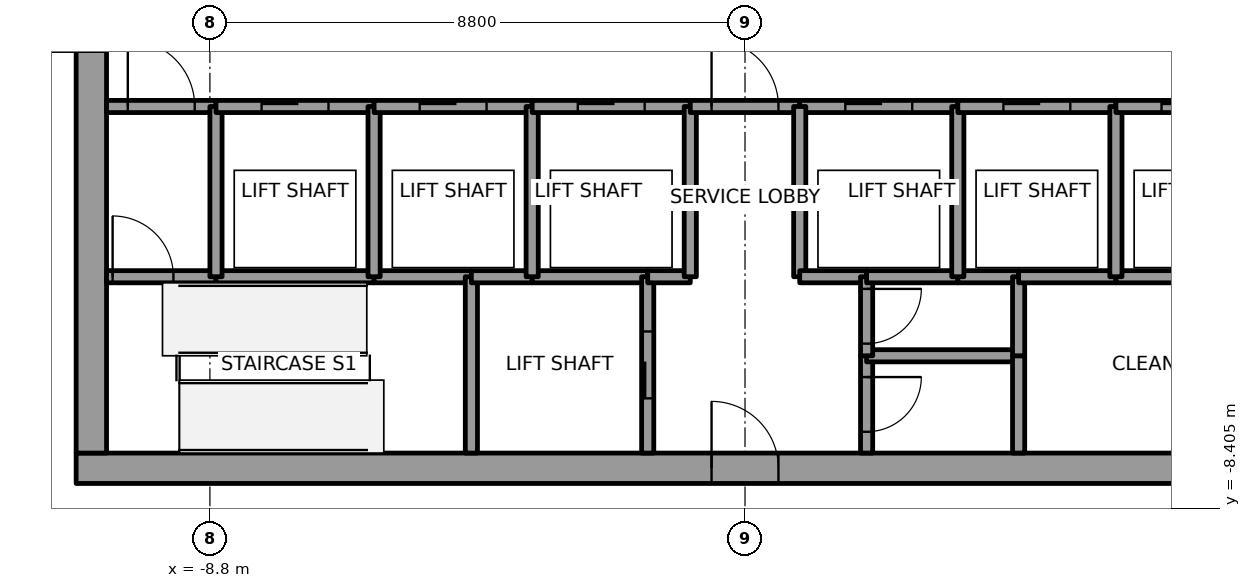
"""IFC4 building model, lengths in metres.
Left out: names, types, materials, properties, quantities, classifications, styles, units other than length and angle.
Written with IfcOpenShell. Run it as: python <this file> out.ifc"""

import sys

from ifc_helpers import new_model, si_unit, direction, frame, frame_2d, origin, place, context, subcontext, project, spatial, rectangle, extrude, element, fill, save


model = new_model("IFC4")
c1 = context("Model", 3, precision=1e-05, world=origin(), true_north=direction((0.0, 1.0)))
c2 = subcontext(c1, "Body", "Model", "MODEL_VIEW")
j1 = project(units=[si_unit("LENGTHUNIT", "METRE"), si_unit("PLANEANGLEUNIT", "RADIAN")], contexts=[c1])
p1 = place(None, origin())
s1 = spatial("IfcSite", under=j1, at=p1, CompositionType="ELEMENT")
p2 = place(p1, origin())
s2 = spatial("IfcBuilding", under=s1, at=p2, CompositionType="ELEMENT")
p3 = place(p2, frame((0.0, 0.0, 271.0)))
s3 = spatial("IfcBuildingStorey", under=s2, at=p3, CompositionType="ELEMENT", Elevation=271.0)
p4 = place(p3, frame((-11.0, -7.75, 0.0), z_axis=(0.0, 0.0, 1.0), x_axis=(1.0, 0.0, 0.0)))
e1 = element("IfcWall", 1, at=p4, inside=s3, PredefinedType="SHEAR", context=c2, shape_type="SweptSolid", body=[
    extrude(rectangle(XDim=22.0, YDim=0.5, at=frame_2d((11.0, 0.0))), origin(), (0.0, 0.0, 1.0), 4.0),
])
p5 = place(p4, frame((10.45, 0.0, 0.0)))
e2 = element("IfcOpeningElement", 2, at=p5, cuts=e1, PredefinedType="OPENING", context=c2, shape_type="SweptSolid", body=[
    extrude(rectangle(XDim=1.1, YDim=2.1, at=frame_2d((0.55, 1.05))), frame((0.0, 0.25, 0.0), z_axis=(0.0, -1.0, 0.0), x_axis=(1.0, 0.0, 0.0)), (0.0, 0.0, 1.0), 0.5),
])
p6 = place(p3, frame((-10.75, -7.5, 0.0), z_axis=(0.0, 0.0, 1.0), x_axis=(0.0, 1.0, 0.0)))
e3 = element("IfcWall", 3, at=p6, inside=s3, PredefinedType="SHEAR", context=c2, shape_type="SweptSolid", body=[
    extrude(rectangle(XDim=15.0, YDim=0.5, at=frame_2d((7.5, 0.0))), origin(), (0.0, 0.0, 1.0), 4.0),
])
p7 = place(p6, frame((6.6, 0.0, 0.0)))
e4 = element("IfcOpeningElement", 4, at=p7, cuts=e3, PredefinedType="OPENING", context=c2, shape_type="SweptSolid", body=[
    extrude(rectangle(XDim=1.8, YDim=2.1, at=frame_2d((0.9, 1.05))), frame((0.0, 0.25, 0.0), z_axis=(0.0, -1.0, 0.0), x_axis=(1.0, 0.0, 0.0)), (0.0, 0.0, 1.0), 0.5),
])
p8 = place(p3, frame((-10.5, -4.6, 0.0), z_axis=(0.0, 0.0, 1.0), x_axis=(1.0, 0.0, 0.0)))
e5 = element("IfcWall", 5, at=p8, inside=s3, PredefinedType="SOLIDWALL", context=c2, shape_type="SweptSolid", body=[
    extrude(rectangle(XDim=1.8, YDim=0.2, at=frame_2d((0.9, 0.0))), origin(), (0.0, 0.0, 1.0), 3.85),
])
p9 = place(p8, frame((0.1, 0.0, 0.0)))
e6 = element("IfcOpeningElement", 6, at=p9, cuts=e5, PredefinedType="OPENING", context=c2, shape_type="SweptSolid", body=[
    extrude(rectangle(XDim=1.0, YDim=2.1, at=frame_2d((0.5, 1.05))), frame((0.0, 0.1, 0.0), z_axis=(0.0, -1.0, 0.0), x_axis=(1.0, 0.0, 0.0)), (0.0, 0.0, 1.0), 0.2),
])
p10 = place(p3, frame((-10.5, -1.8, 0.0), z_axis=(0.0, 0.0, 1.0), x_axis=(1.0, 0.0, 0.0)))
e7 = element("IfcWall", 7, at=p10, inside=s3, PredefinedType="SOLIDWALL", context=c2, shape_type="SweptSolid", body=[
    extrude(rectangle(XDim=1.8, YDim=0.2, at=frame_2d((0.9, 0.0))), origin(), (0.0, 0.0, 1.0), 3.85),
])
p11 = place(p10, frame((0.35, 0.0, 0.0)))
e8 = element("IfcOpeningElement", 8, at=p11, cuts=e7, PredefinedType="OPENING", context=c2, shape_type="SweptSolid", body=[
    extrude(rectangle(XDim=1.1, YDim=2.1, at=frame_2d((0.55, 1.05))), frame((0.0, 0.1, 0.0), z_axis=(0.0, -1.0, 0.0), x_axis=(1.0, 0.0, 0.0)), (0.0, 0.0, 1.0), 0.2),
])
p12 = place(p3, frame((-8.7, -4.6, 0.0), z_axis=(0.0, 0.0, 1.0), x_axis=(1.0, 0.0, 0.0)))
e9 = element("IfcWall", 9, at=p12, inside=s3, PredefinedType="SOLIDWALL", context=c2, shape_type="SweptSolid", body=[
    extrude(rectangle(XDim=2.6, YDim=0.2, at=frame_2d((1.3, 0.0))), origin(), (0.0, 0.0, 1.0), 3.85),
])
p13 = place(p3, frame((-8.7, -4.6, 0.0), z_axis=(0.0, 0.0, 1.0), x_axis=(0.0, 1.0, 0.0)))
e10 = element("IfcWall", 10, at=p13, inside=s3, PredefinedType="SOLIDWALL", context=c2, shape_type="SweptSolid", body=[
    extrude(rectangle(XDim=2.8, YDim=0.2, at=frame_2d((1.4, 0.0))), origin(), (0.0, 0.0, 1.0), 3.85),
])
p14 = place(p3, frame((-8.7, -1.8, 0.0), z_axis=(0.0, 0.0, 1.0), x_axis=(1.0, 0.0, 0.0)))
e11 = element("IfcWall", 11, at=p14, inside=s3, PredefinedType="SOLIDWALL", context=c2, shape_type="SweptSolid", body=[
    extrude(rectangle(XDim=2.6, YDim=0.2, at=frame_2d((1.3, 0.0))), origin(), (0.0, 0.0, 1.0), 3.85),
])
p15 = place(p14, frame((0.75, 0.0, 0.0)))
e12 = element("IfcOpeningElement", 12, at=p15, cuts=e11, PredefinedType="OPENING", context=c2, shape_type="SweptSolid", body=[
    extrude(rectangle(XDim=1.1, YDim=2.1, at=frame_2d((0.55, 1.05))), frame((0.0, 0.1, 0.0), z_axis=(0.0, -1.0, 0.0), x_axis=(1.0, 0.0, 0.0)), (0.0, 0.0, 1.0), 0.2),
])
p16 = place(p3, frame((-6.1, -4.6, 0.0), z_axis=(0.0, 0.0, 1.0), x_axis=(1.0, 0.0, 0.0)))
e13 = element("IfcWall", 13, at=p16, inside=s3, PredefinedType="SOLIDWALL", context=c2, shape_type="SweptSolid", body=[
    extrude(rectangle(XDim=1.6, YDim=0.2, at=frame_2d((0.8, 0.0))), origin(), (0.0, 0.0, 1.0), 3.85),
])
p17 = place(p3, frame((-6.1, -4.6, 0.0), z_axis=(0.0, 0.0, 1.0), x_axis=(0.0, 1.0, 0.0)))
e14 = element("IfcWall", 14, at=p17, inside=s3, PredefinedType="SOLIDWALL", context=c2, shape_type="SweptSolid", body=[
    extrude(rectangle(XDim=2.8, YDim=0.2, at=frame_2d((1.4, 0.0))), origin(), (0.0, 0.0, 1.0), 3.85),
])
p18 = place(p3, frame((-6.1, -1.8, 0.0), z_axis=(0.0, 0.0, 1.0), x_axis=(1.0, 0.0, 0.0)))
e15 = element("IfcWall", 15, at=p18, inside=s3, PredefinedType="SOLIDWALL", context=c2, shape_type="SweptSolid", body=[
    extrude(rectangle(XDim=2.6, YDim=0.2, at=frame_2d((1.3, 0.0))), origin(), (0.0, 0.0, 1.0), 3.85),
])
p19 = place(p18, frame((0.75, 0.0, 0.0)))
e16 = element("IfcOpeningElement", 16, at=p19, cuts=e15, PredefinedType="OPENING", context=c2, shape_type="SweptSolid", body=[
    extrude(rectangle(XDim=1.1, YDim=2.1, at=frame_2d((0.55, 1.05))), frame((0.0, 0.1, 0.0), z_axis=(0.0, -1.0, 0.0), x_axis=(1.0, 0.0, 0.0)), (0.0, 0.0, 1.0), 0.2),
])
p20 = place(p3, frame((-4.5, -4.6, 0.0), z_axis=(0.0, 0.0, 1.0), x_axis=(0.0, -1.0, 0.0)))
e17 = element("IfcWall", 17, at=p20, inside=s3, PredefinedType="SOLIDWALL", context=c2, shape_type="SweptSolid", body=[
    extrude(rectangle(XDim=2.9, YDim=0.2, at=frame_2d((1.45, 0.0))), origin(), (0.0, 0.0, 1.0), 3.85),
])
p21 = place(p3, frame((-4.5, -4.6, 0.0), z_axis=(0.0, 0.0, 1.0), x_axis=(1.0, 0.0, 0.0)))
e18 = element("IfcWall", 18, at=p21, inside=s3, PredefinedType="SOLIDWALL", context=c2, shape_type="SweptSolid", body=[
    extrude(rectangle(XDim=1.0, YDim=0.2, at=frame_2d((0.5, 0.0))), origin(), (0.0, 0.0, 1.0), 3.85),
])
p22 = place(p3, frame((-3.5, -4.6, 0.0), z_axis=(0.0, 0.0, 1.0), x_axis=(1.0, 0.0, 0.0)))
e19 = element("IfcWall", 19, at=p22, inside=s3, PredefinedType="SOLIDWALL", context=c2, shape_type="SweptSolid", body=[
    extrude(rectangle(XDim=1.9, YDim=0.2, at=frame_2d((0.95, 0.0))), origin(), (0.0, 0.0, 1.0), 3.85),
])
p23 = place(p3, frame((-3.5, -4.6, 0.0), z_axis=(0.0, 0.0, 1.0), x_axis=(0.0, 1.0, 0.0)))
e20 = element("IfcWall", 20, at=p23, inside=s3, PredefinedType="SOLIDWALL", context=c2, shape_type="SweptSolid", body=[
    extrude(rectangle(XDim=2.8, YDim=0.2, at=frame_2d((1.4, 0.0))), origin(), (0.0, 0.0, 1.0), 3.85),
])
p24 = place(p3, frame((-3.5, -1.8, 0.0), z_axis=(0.0, 0.0, 1.0), x_axis=(1.0, 0.0, 0.0)))
e21 = element("IfcWall", 21, at=p24, inside=s3, PredefinedType="SOLIDWALL", context=c2, shape_type="SweptSolid", body=[
    extrude(rectangle(XDim=2.6, YDim=0.2, at=frame_2d((1.3, 0.0))), origin(), (0.0, 0.0, 1.0), 3.85),
])
p25 = place(p24, frame((0.75, 0.0, 0.0)))
e22 = element("IfcOpeningElement", 22, at=p25, cuts=e21, PredefinedType="OPENING", context=c2, shape_type="SweptSolid", body=[
    extrude(rectangle(XDim=1.1, YDim=2.1, at=frame_2d((0.55, 1.05))), frame((0.0, 0.1, 0.0), z_axis=(0.0, -1.0, 0.0), x_axis=(1.0, 0.0, 0.0)), (0.0, 0.0, 1.0), 0.2),
])
p26 = place(p3, frame((-1.6, -7.5, 0.0), z_axis=(0.0, 0.0, 1.0), x_axis=(0.0, 1.0, 0.0)))
e23 = element("IfcWall", 23, at=p26, inside=s3, PredefinedType="SOLIDWALL", context=c2, shape_type="SweptSolid", body=[
    extrude(rectangle(XDim=2.9, YDim=0.2, at=frame_2d((1.45, 0.0))), origin(), (0.0, 0.0, 1.0), 3.85),
])
p27 = place(p26, frame((0.9, 0.0, 0.0)))
e24 = element("IfcOpeningElement", 24, at=p27, cuts=e23, PredefinedType="OPENING", context=c2, shape_type="SweptSolid", body=[
    extrude(rectangle(XDim=1.1, YDim=2.1, at=frame_2d((0.55, 1.05))), frame((0.0, 0.1, 0.0), z_axis=(0.0, -1.0, 0.0), x_axis=(1.0, 0.0, 0.0)), (0.0, 0.0, 1.0), 0.2),
])
p28 = place(p3, frame((-1.6, -4.6, 0.0), z_axis=(0.0, 0.0, 1.0), x_axis=(1.0, 0.0, 0.0)))
e25 = element("IfcWall", 25, at=p28, inside=s3, PredefinedType="SOLIDWALL", context=c2, shape_type="SweptSolid", body=[
    extrude(rectangle(XDim=0.7, YDim=0.2, at=frame_2d((0.35, 0.0))), origin(), (0.0, 0.0, 1.0), 3.85),
])
p29 = place(p3, frame((-0.9, -4.6, 0.0), z_axis=(0.0, 0.0, 1.0), x_axis=(0.0, 1.0, 0.0)))
e26 = element("IfcWall", 26, at=p29, inside=s3, PredefinedType="SOLIDWALL", context=c2, shape_type="SweptSolid", body=[
    extrude(rectangle(XDim=2.8, YDim=0.2, at=frame_2d((1.4, 0.0))), origin(), (0.0, 0.0, 1.0), 3.85),
])
p30 = place(p3, frame((-0.9, -1.8, 0.0), z_axis=(0.0, 0.0, 1.0), x_axis=(1.0, 0.0, 0.0)))
e27 = element("IfcWall", 27, at=p30, inside=s3, PredefinedType="SOLIDWALL", context=c2, shape_type="SweptSolid", body=[
    extrude(rectangle(XDim=1.8, YDim=0.2, at=frame_2d((0.9, 0.0))), origin(), (0.0, 0.0, 1.0), 3.85),
])
p31 = place(p30, frame((0.35, 0.0, 0.0)))
e28 = element("IfcOpeningElement", 28, at=p31, cuts=e27, PredefinedType="OPENING", context=c2, shape_type="SweptSolid", body=[
    extrude(rectangle(XDim=1.1, YDim=2.1, at=frame_2d((0.55, 1.05))), frame((0.0, 0.1, 0.0), z_axis=(0.0, -1.0, 0.0), x_axis=(1.0, 0.0, 0.0)), (0.0, 0.0, 1.0), 0.2),
])
p32 = place(p3, frame((0.9, -1.8, 0.0), z_axis=(0.0, 0.0, 1.0), x_axis=(1.0, 0.0, 0.0)))
e29 = element("IfcWall", 29, at=p32, inside=s3, PredefinedType="SOLIDWALL", context=c2, shape_type="SweptSolid", body=[
    extrude(rectangle(XDim=2.6, YDim=0.2, at=frame_2d((1.3, 0.0))), origin(), (0.0, 0.0, 1.0), 3.85),
])
p33 = place(p32, frame((0.75, 0.0, 0.0)))
e30 = element("IfcOpeningElement", 30, at=p33, cuts=e29, PredefinedType="OPENING", context=c2, shape_type="SweptSolid", body=[
    extrude(rectangle(XDim=1.1, YDim=2.1, at=frame_2d((0.55, 1.05))), frame((0.0, 0.1, 0.0), z_axis=(0.0, -1.0, 0.0), x_axis=(1.0, 0.0, 0.0)), (0.0, 0.0, 1.0), 0.2),
])
p34 = place(p3, frame((0.9, -1.8, 0.0), z_axis=(0.0, 0.0, 1.0), x_axis=(0.0, -1.0, 0.0)))
e31 = element("IfcWall", 31, at=p34, inside=s3, PredefinedType="SOLIDWALL", context=c2, shape_type="SweptSolid", body=[
    extrude(rectangle(XDim=2.8, YDim=0.2, at=frame_2d((1.4, 0.0))), origin(), (0.0, 0.0, 1.0), 3.85),
])
p35 = place(p3, frame((0.9, -4.6, 0.0), z_axis=(0.0, 0.0, 1.0), x_axis=(1.0, 0.0, 0.0)))
e32 = element("IfcWall", 32, at=p35, inside=s3, PredefinedType="SOLIDWALL", context=c2, shape_type="SweptSolid", body=[
    extrude(rectangle(XDim=1.1, YDim=0.2, at=frame_2d((0.55, 0.0))), origin(), (0.0, 0.0, 1.0), 3.85),
])
p36 = place(p3, frame((2.0, -5.9, 0.0), z_axis=(0.0, 0.0, 1.0), x_axis=(0.0, -1.0, 0.0)))
e33 = element("IfcWall", 33, at=p36, inside=s3, PredefinedType="SOLIDWALL", context=c2, shape_type="SweptSolid", body=[
    extrude(rectangle(XDim=1.6, YDim=0.2, at=frame_2d((0.8, 0.0))), origin(), (0.0, 0.0, 1.0), 3.85),
])
p37 = place(p36, frame((0.35, 0.0, 0.0)))
e34 = element("IfcOpeningElement", 34, at=p37, cuts=e33, PredefinedType="OPENING", context=c2, shape_type="SweptSolid", body=[
    extrude(rectangle(XDim=0.9, YDim=2.1, at=frame_2d((0.45, 1.05))), frame((0.0, 0.1, 0.0), z_axis=(0.0, -1.0, 0.0), x_axis=(1.0, 0.0, 0.0)), (0.0, 0.0, 1.0), 0.2),
])
p38 = place(p3, frame((4.5, -5.9, 0.0), z_axis=(0.0, 0.0, 1.0), x_axis=(-1.0, 0.0, 0.0)))
e35 = element("IfcWall", 35, at=p38, inside=s3, PredefinedType="SOLIDWALL", context=c2, shape_type="SweptSolid", body=[
    extrude(rectangle(XDim=2.5, YDim=0.2, at=frame_2d((1.25, 0.0))), origin(), (0.0, 0.0, 1.0), 3.85),
])
p39 = place(p3, frame((2.0, -4.6, 0.0), z_axis=(0.0, 0.0, 1.0), x_axis=(0.0, -1.0, 0.0)))
e36 = element("IfcWall", 36, at=p39, inside=s3, PredefinedType="SOLIDWALL", context=c2, shape_type="SweptSolid", body=[
    extrude(rectangle(XDim=1.3, YDim=0.2, at=frame_2d((0.65, 0.0))), origin(), (0.0, 0.0, 1.0), 3.85),
])
p40 = place(p39, frame((0.2, 0.0, 0.0)))
e37 = element("IfcOpeningElement", 37, at=p40, cuts=e36, PredefinedType="OPENING", context=c2, shape_type="SweptSolid", body=[
    extrude(rectangle(XDim=0.9, YDim=2.1, at=frame_2d((0.45, 1.05))), frame((0.0, 0.1, 0.0), z_axis=(0.0, -1.0, 0.0), x_axis=(1.0, 0.0, 0.0)), (0.0, 0.0, 1.0), 0.2),
])
p41 = place(p3, frame((3.5, -4.6, 0.0), z_axis=(0.0, 0.0, 1.0), x_axis=(-1.0, 0.0, 0.0)))
e38 = element("IfcWall", 38, at=p41, inside=s3, PredefinedType="SOLIDWALL", context=c2, shape_type="SweptSolid", body=[
    extrude(rectangle(XDim=1.5, YDim=0.2, at=frame_2d((0.75, 0.0))), origin(), (0.0, 0.0, 1.0), 3.85),
])
p42 = place(p3, frame((4.5, -4.6, 0.0), z_axis=(0.0, 0.0, 1.0), x_axis=(-1.0, 0.0, 0.0)))
e39 = element("IfcWall", 39, at=p42, inside=s3, PredefinedType="SOLIDWALL", context=c2, shape_type="SweptSolid", body=[
    extrude(rectangle(XDim=1.0, YDim=0.2, at=frame_2d((0.5, 0.0))), origin(), (0.0, 0.0, 1.0), 3.85),
])
p43 = place(p3, frame((3.5, -4.6, 0.0), z_axis=(0.0, 0.0, 1.0), x_axis=(0.0, 1.0, 0.0)))
e40 = element("IfcWall", 40, at=p43, inside=s3, PredefinedType="SOLIDWALL", context=c2, shape_type="SweptSolid", body=[
    extrude(rectangle(XDim=2.8, YDim=0.2, at=frame_2d((1.4, 0.0))), origin(), (0.0, 0.0, 1.0), 3.85),
])
p44 = place(p3, frame((3.5, -1.8, 0.0), z_axis=(0.0, 0.0, 1.0), x_axis=(1.0, 0.0, 0.0)))
e41 = element("IfcWall", 41, at=p44, inside=s3, PredefinedType="SOLIDWALL", context=c2, shape_type="SweptSolid", body=[
    extrude(rectangle(XDim=2.6, YDim=0.2, at=frame_2d((1.3, 0.0))), origin(), (0.0, 0.0, 1.0), 3.85),
])
p45 = place(p44, frame((0.75, 0.0, 0.0)))
e42 = element("IfcOpeningElement", 42, at=p45, cuts=e41, PredefinedType="OPENING", context=c2, shape_type="SweptSolid", body=[
    extrude(rectangle(XDim=1.1, YDim=2.1, at=frame_2d((0.55, 1.05))), frame((0.0, 0.1, 0.0), z_axis=(0.0, -1.0, 0.0), x_axis=(1.0, 0.0, 0.0)), (0.0, 0.0, 1.0), 0.2),
])
p46 = place(p3, frame((4.5, -5.9, 0.0), z_axis=(0.0, 0.0, 1.0), x_axis=(0.0, -1.0, 0.0)))
e43 = element("IfcWall", 43, at=p46, inside=s3, PredefinedType="SOLIDWALL", context=c2, shape_type="SweptSolid", body=[
    extrude(rectangle(XDim=1.6, YDim=0.2, at=frame_2d((0.8, 0.0))), origin(), (0.0, 0.0, 1.0), 3.85),
])
p47 = place(p3, frame((4.5, -4.6, 0.0), z_axis=(0.0, 0.0, 1.0), x_axis=(0.0, -1.0, 0.0)))
e44 = element("IfcWall", 44, at=p47, inside=s3, PredefinedType="SOLIDWALL", context=c2, shape_type="SweptSolid", body=[
    extrude(rectangle(XDim=1.3, YDim=0.2, at=frame_2d((0.65, 0.0))), origin(), (0.0, 0.0, 1.0), 3.85),
])
p48 = place(p3, frame((6.1, -4.6, 0.0), z_axis=(0.0, 0.0, 1.0), x_axis=(-1.0, 0.0, 0.0)))
e45 = element("IfcWall", 45, at=p48, inside=s3, PredefinedType="SOLIDWALL", context=c2, shape_type="SweptSolid", body=[
    extrude(rectangle(XDim=1.6, YDim=0.2, at=frame_2d((0.8, 0.0))), origin(), (0.0, 0.0, 1.0), 3.85),
])
p49 = place(p3, frame((8.7, -4.6, 0.0), z_axis=(0.0, 0.0, 1.0), x_axis=(-1.0, 0.0, 0.0)))
e46 = element("IfcWall", 46, at=p49, inside=s3, PredefinedType="SOLIDWALL", context=c2, shape_type="SweptSolid", body=[
    extrude(rectangle(XDim=2.6, YDim=0.2, at=frame_2d((1.3, 0.0))), origin(), (0.0, 0.0, 1.0), 3.85),
])
p50 = place(p3, frame((6.1, -4.6, 0.0), z_axis=(0.0, 0.0, 1.0), x_axis=(0.0, 1.0, 0.0)))
e47 = element("IfcWall", 47, at=p50, inside=s3, PredefinedType="SOLIDWALL", context=c2, shape_type="SweptSolid", body=[
    extrude(rectangle(XDim=2.8, YDim=0.2, at=frame_2d((1.4, 0.0))), origin(), (0.0, 0.0, 1.0), 3.85),
])
p51 = place(p3, frame((6.1, -1.8, 0.0), z_axis=(0.0, 0.0, 1.0), x_axis=(1.0, 0.0, 0.0)))
e48 = element("IfcWall", 48, at=p51, inside=s3, PredefinedType="SOLIDWALL", context=c2, shape_type="SweptSolid", body=[
    extrude(rectangle(XDim=2.6, YDim=0.2, at=frame_2d((1.3, 0.0))), origin(), (0.0, 0.0, 1.0), 3.85),
])
p52 = place(p51, frame((0.75, 0.0, 0.0)))
e49 = element("IfcOpeningElement", 49, at=p52, cuts=e48, PredefinedType="OPENING", context=c2, shape_type="SweptSolid", body=[
    extrude(rectangle(XDim=1.1, YDim=2.1, at=frame_2d((0.55, 1.05))), frame((0.0, 0.1, 0.0), z_axis=(0.0, -1.0, 0.0), x_axis=(1.0, 0.0, 0.0)), (0.0, 0.0, 1.0), 0.2),
])
p53 = place(p15, origin())
e50 = element("IfcDoor", 50, at=p53, inside=s3, OperationType="SLIDING_TO_LEFT", PredefinedType="DOOR", context=c2, shape_type="SweptSolid", body=[
    extrude(rectangle(XDim=1.1, YDim=2.1, at=frame_2d((0.55, 1.05))), frame((0.0, 0.025, 0.0), z_axis=(0.0, -1.0, 0.0), x_axis=(1.0, 0.0, 0.0)), (0.0, 0.0, 1.0), 0.05),
])
fill(e12, e50)
p54 = place(p19, origin())
e51 = element("IfcDoor", 51, at=p54, inside=s3, OperationType="SLIDING_TO_RIGHT", PredefinedType="DOOR", context=c2, shape_type="SweptSolid", body=[
    extrude(rectangle(XDim=1.1, YDim=2.1, at=frame_2d((0.55, 1.05))), frame((0.0, 0.025, 0.0), z_axis=(0.0, -1.0, 0.0), x_axis=(1.0, 0.0, 0.0)), (0.0, 0.0, 1.0), 0.05),
])
fill(e16, e51)
p55 = place(p25, origin())
e52 = element("IfcDoor", 52, at=p55, inside=s3, OperationType="SLIDING_TO_RIGHT", PredefinedType="DOOR", context=c2, shape_type="SweptSolid", body=[
    extrude(rectangle(XDim=1.1, YDim=2.1, at=frame_2d((0.55, 1.05))), frame((0.0, 0.025, 0.0), z_axis=(0.0, -1.0, 0.0), x_axis=(1.0, 0.0, 0.0)), (0.0, 0.0, 1.0), 0.05),
])
fill(e22, e52)
p56 = place(p33, origin())
e53 = element("IfcDoor", 53, at=p56, inside=s3, OperationType="SLIDING_TO_LEFT", PredefinedType="DOOR", context=c2, shape_type="SweptSolid", body=[
    extrude(rectangle(XDim=1.1, YDim=2.1, at=frame_2d((0.55, 1.05))), frame((0.0, 0.025, 0.0), z_axis=(0.0, -1.0, 0.0), x_axis=(1.0, 0.0, 0.0)), (0.0, 0.0, 1.0), 0.05),
])
fill(e30, e53)
p57 = place(p45, origin())
e54 = element("IfcDoor", 54, at=p57, inside=s3, OperationType="SLIDING_TO_LEFT", PredefinedType="DOOR", context=c2, shape_type="SweptSolid", body=[
    extrude(rectangle(XDim=1.1, YDim=2.1, at=frame_2d((0.55, 1.05))), frame((0.0, 0.025, 0.0), z_axis=(0.0, -1.0, 0.0), x_axis=(1.0, 0.0, 0.0)), (0.0, 0.0, 1.0), 0.05),
])
fill(e42, e54)
p58 = place(p52, origin())
e55 = element("IfcDoor", 55, at=p58, inside=s3, OperationType="SLIDING_TO_RIGHT", PredefinedType="DOOR", context=c2, shape_type="SweptSolid", body=[
    extrude(rectangle(XDim=1.1, YDim=2.1, at=frame_2d((0.55, 1.05))), frame((0.0, 0.025, 0.0), z_axis=(0.0, -1.0, 0.0), x_axis=(1.0, 0.0, 0.0)), (0.0, 0.0, 1.0), 0.05),
])
fill(e49, e55)
p59 = place(p27, origin())
e56 = element("IfcDoor", 56, at=p59, inside=s3, OperationType="SLIDING_TO_LEFT", PredefinedType="DOOR", context=c2, shape_type="SweptSolid", body=[
    extrude(rectangle(XDim=1.1, YDim=2.1, at=frame_2d((0.55, 1.05))), frame((0.0, 0.025, 0.0), z_axis=(0.0, -1.0, 0.0), x_axis=(1.0, 0.0, 0.0)), (0.0, 0.0, 1.0), 0.05),
])
fill(e24, e56)
p60 = place(p11, origin())
e57 = element("IfcDoor", 57, at=p60, inside=s3, OperationType="SINGLE_SWING_RIGHT", PredefinedType="DOOR", context=c2, shape_type="SweptSolid", body=[
    extrude(rectangle(XDim=1.1, YDim=2.1, at=frame_2d((0.55, 1.05))), frame((0.0, 0.025, 0.0), z_axis=(0.0, -1.0, 0.0), x_axis=(1.0, 0.0, 0.0)), (0.0, 0.0, 1.0), 0.05),
])
fill(e8, e57)
p61 = place(p31, origin())
e58 = element("IfcDoor", 58, at=p61, inside=s3, OperationType="SINGLE_SWING_LEFT", PredefinedType="DOOR", context=c2, shape_type="SweptSolid", body=[
    extrude(rectangle(XDim=1.1, YDim=2.1, at=frame_2d((0.55, 1.05))), frame((0.0, 0.025, 0.0), z_axis=(0.0, -1.0, 0.0), x_axis=(1.0, 0.0, 0.0)), (0.0, 0.0, 1.0), 0.05),
])
fill(e28, e58)
p62 = place(p9, origin())
e59 = element("IfcDoor", 59, at=p62, inside=s3, OperationType="SINGLE_SWING_LEFT", PredefinedType="DOOR", context=c2, shape_type="SweptSolid", body=[
    extrude(rectangle(XDim=1.0, YDim=2.1, at=frame_2d((0.5, 1.05))), frame((0.0, 0.025, 0.0), z_axis=(0.0, -1.0, 0.0), x_axis=(1.0, 0.0, 0.0)), (0.0, 0.0, 1.0), 0.05),
])
fill(e6, e59)
p63 = place(p37, origin())
e60 = element("IfcDoor", 60, at=p63, inside=s3, OperationType="SINGLE_SWING_LEFT", PredefinedType="DOOR", context=c2, shape_type="SweptSolid", body=[
    extrude(rectangle(XDim=0.9, YDim=2.1, at=frame_2d((0.45, 1.05))), frame((0.0, 0.025, 0.0), z_axis=(0.0, -1.0, 0.0), x_axis=(1.0, 0.0, 0.0)), (0.0, 0.0, 1.0), 0.05),
])
fill(e34, e60)
p64 = place(p40, origin())
e61 = element("IfcDoor", 61, at=p64, inside=s3, OperationType="SINGLE_SWING_RIGHT", PredefinedType="DOOR", context=c2, shape_type="SweptSolid", body=[
    extrude(rectangle(XDim=0.9, YDim=2.1, at=frame_2d((0.45, 1.05))), frame((0.0, 0.025, 0.0), z_axis=(0.0, -1.0, 0.0), x_axis=(1.0, 0.0, 0.0)), (0.0, 0.0, 1.0), 0.05),
])
fill(e37, e61)
p65 = place(p7, origin())
e62 = element("IfcDoor", 62, at=p65, inside=s3, OperationType="DOUBLE_DOOR_SINGLE_SWING", PredefinedType="DOOR", context=c2, shape_type="SweptSolid", body=[
    extrude(rectangle(XDim=1.8, YDim=2.1, at=frame_2d((0.9, 1.05))), frame((0.0, 0.025, 0.0), z_axis=(0.0, -1.0, 0.0), x_axis=(1.0, 0.0, 0.0)), (0.0, 0.0, 1.0), 0.05),
])
fill(e4, e62)
p66 = place(p5, origin())
e63 = element("IfcDoor", 63, at=p66, inside=s3, OperationType="SINGLE_SWING_LEFT", PredefinedType="DOOR", context=c2, shape_type="SweptSolid", body=[
    extrude(rectangle(XDim=1.1, YDim=2.1, at=frame_2d((0.55, 1.05))), frame((0.0, 0.025, 0.0), z_axis=(0.0, -1.0, 0.0), x_axis=(1.0, 0.0, 0.0)), (0.0, 0.0, 1.0), 0.05),
])
fill(e2, e63)
save(model, sys.argv[1])
